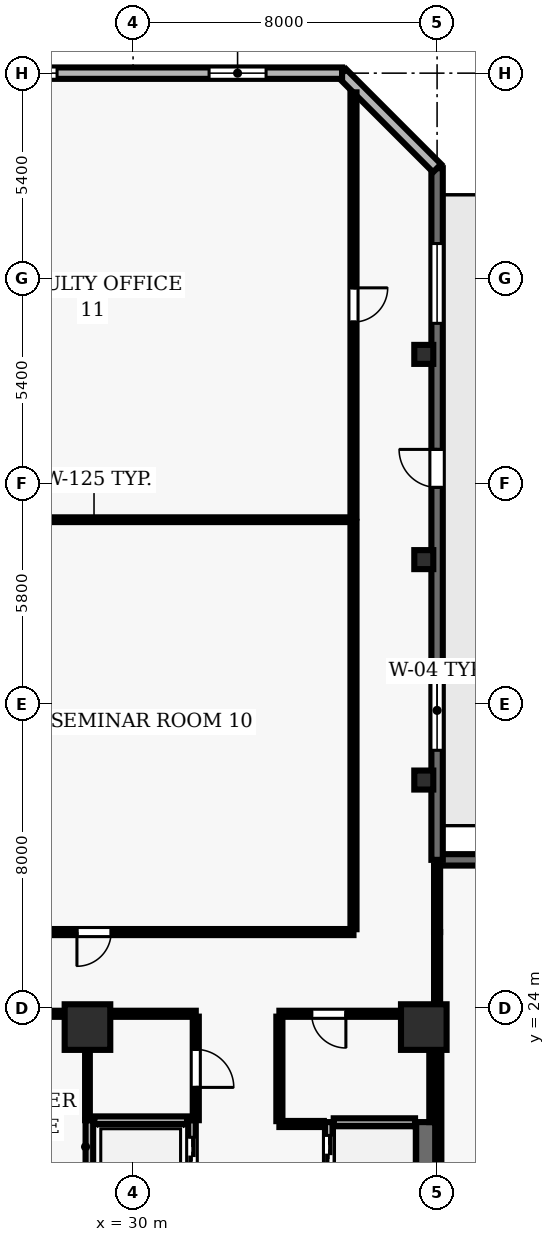
"""IFC4 building model, lengths in metres.
Left out: names, types, materials, properties, quantities, classifications, styles, units other than length and angle.
Written with IfcOpenShell. Run it as: python <this file> out.ifc"""

import sys

from ifc_helpers import new_model, si_unit, direction, frame, frame_2d, origin, origin_2d, place, context, subcontext, project, spatial, rectangle, hollow_rectangle, extrude, element, fill, save


model = new_model("IFC4")
c1 = context("Model", 3, precision=1e-05, world=origin(), true_north=direction((0.0, 1.0)))
c2 = subcontext(c1, "Body", "Model", "MODEL_VIEW")
j1 = project(units=[si_unit("LENGTHUNIT", "METRE"), si_unit("PLANEANGLEUNIT", "RADIAN")], contexts=[c1])
p1 = place(None, origin())
s1 = spatial("IfcSite", under=j1, at=p1, CompositionType="ELEMENT")
p2 = place(p1, origin())
s2 = spatial("IfcBuilding", under=s1, at=p2, CompositionType="ELEMENT")
p3 = place(p2, frame((0.0, 0.0, 130.7)))
s3 = spatial("IfcBuildingStorey", under=s2, at=p3, CompositionType="ELEMENT", Elevation=130.7)
for number, where, z_axis, x_axis in (
    (1, (28.8, 23.5, 0.0), (0.0, 0.0, 1.0), (1.0, 0.0, 0.0)),
    (2, (37.65, 23.5, 0.0), (0.0, 0.0, 1.0), (1.0, 0.0, 0.0)),
):
    element("IfcColumn", number, at=place(p3, frame(where, z_axis=z_axis, x_axis=x_axis)), inside=s3, PredefinedType="COLUMN", context=c2, shape_type="SweptSolid", body=[
        extrude(rectangle(XDim=1.2, YDim=1.2, at=origin_2d()), origin(), (0.0, 0.0, 1.0), 3.9),
    ])
for number, where, z_axis, x_axis in (
    (3, (37.65, 30.0, 0.0), (0.0, 0.0, 1.0), (1.0, 0.0, 0.0)),
    (4, (37.65, 35.8, 0.0), (0.0, 0.0, 1.0), (1.0, 0.0, 0.0)),
    (5, (37.65, 41.2, 0.0), (0.0, 0.0, 1.0), (1.0, 0.0, 0.0)),
):
    element("IfcColumn", number, at=place(p3, frame(where, z_axis=z_axis, x_axis=x_axis)), inside=s3, PredefinedType="COLUMN", context=c2, shape_type="SweptSolid", body=[
        extrude(hollow_rectangle(XDim=0.5, YDim=0.5, WallThickness=0.025, at=origin_2d()), origin(), (0.0, 0.0, 1.0), 3.9),
    ])
p4 = place(p3, frame((46.151, 27.9, 0.0), z_axis=(0.0, 0.0, 1.0), x_axis=(-1.0, 0.0, 0.0)))
e6 = element("IfcWall", 6, at=p4, inside=s3, PredefinedType="SOLIDWALL", context=c2, shape_type="SweptSolid", body=[
    extrude(rectangle(XDim=8.151, YDim=0.3, at=frame_2d((4.075, 0.0))), origin(), (0.0, 0.0, 1.0), 3.69),
])
p5 = place(p4, frame((3.176, 0.0, 0.9)))
e7 = element("IfcOpeningElement", 7, at=p5, cuts=e6, PredefinedType="OPENING", context=c2, shape_type="SweptSolid", body=[
    extrude(rectangle(XDim=1.8, YDim=1.6, at=frame_2d((0.9, 0.8))), frame((0.0, 0.16, 0.0), z_axis=(0.0, -1.0, 0.0), x_axis=(1.0, 0.0, 0.0)), (0.0, 0.0, 1.0), 0.32),
])
p6 = place(p3, frame((38.0, 27.9, 0.0), z_axis=(0.0, 0.0, 1.0), x_axis=(0.0, 1.0, 0.0)))
e8 = element("IfcWall", 8, at=p6, inside=s3, PredefinedType="SOLIDWALL", context=c2, shape_type="SweptSolid", body=[
    extrude(rectangle(XDim=18.2, YDim=0.3, at=frame_2d((9.1, 0.0))), origin(), (0.0, 0.0, 1.0), 3.69),
])
p7 = place(p6, frame((9.8, 0.0, 0.0)))
e9 = element("IfcOpeningElement", 9, at=p7, cuts=e8, PredefinedType="OPENING", context=c2, shape_type="SweptSolid", body=[
    extrude(rectangle(XDim=1.0, YDim=2.2, at=frame_2d((0.5, 1.1))), frame((0.0, 0.16, 0.0), z_axis=(0.0, -1.0, 0.0), x_axis=(1.0, 0.0, 0.0)), (0.0, 0.0, 1.0), 0.32),
])
p8 = place(p6, frame((2.883, 0.0, 0.9)))
e10 = element("IfcOpeningElement", 10, at=p8, cuts=e8, PredefinedType="OPENING", context=c2, shape_type="SweptSolid", body=[
    extrude(rectangle(XDim=2.1, YDim=1.6, at=frame_2d((1.05, 0.8))), frame((0.0, 0.16, 0.0), z_axis=(0.0, -1.0, 0.0), x_axis=(1.0, 0.0, 0.0)), (0.0, 0.0, 1.0), 0.32),
])
p9 = place(p6, frame((14.117, 0.0, 0.9)))
e11 = element("IfcOpeningElement", 11, at=p9, cuts=e8, PredefinedType="OPENING", context=c2, shape_type="SweptSolid", body=[
    extrude(rectangle(XDim=2.1, YDim=1.6, at=frame_2d((1.05, 0.8))), frame((0.0, 0.16, 0.0), z_axis=(0.0, -1.0, 0.0), x_axis=(1.0, 0.0, 0.0)), (0.0, 0.0, 1.0), 0.32),
])
p10 = place(p3, frame((38.0, 46.1, 0.0), z_axis=(0.0, 0.0, 1.0), x_axis=(-0.707106781187, 0.707106781187, 0.0)))
e12 = element("IfcWall", 12, at=p10, inside=s3, PredefinedType="SOLIDWALL", context=c2, shape_type="SweptSolid", body=[
    extrude(rectangle(XDim=3.536, YDim=0.3, at=frame_2d((1.768, 0.0))), origin(), (0.0, 0.0, 1.0), 3.69),
])
p11 = place(p3, frame((35.5, 48.6, 0.0), z_axis=(0.0, 0.0, 1.0), x_axis=(-1.0, 0.0, 0.0)))
e13 = element("IfcWall", 13, at=p11, inside=s3, PredefinedType="SOLIDWALL", context=c2, shape_type="SweptSolid", body=[
    extrude(rectangle(XDim=11.0, YDim=0.3, at=frame_2d((5.5, 0.0))), origin(), (0.0, 0.0, 1.0), 3.69),
])
p12 = place(p11, frame((2.0, 0.0, 0.9)))
e14 = element("IfcOpeningElement", 14, at=p12, cuts=e13, PredefinedType="OPENING", context=c2, shape_type="SweptSolid", body=[
    extrude(rectangle(XDim=1.5, YDim=1.8, at=frame_2d((0.75, 0.9))), frame((0.0, 0.16, 0.0), z_axis=(0.0, -1.0, 0.0), x_axis=(1.0, 0.0, 0.0)), (0.0, 0.0, 1.0), 0.32),
])
p13 = place(p11, frame((7.5, 0.0, 0.9)))
e15 = element("IfcOpeningElement", 15, at=p13, cuts=e13, PredefinedType="OPENING", context=c2, shape_type="SweptSolid", body=[
    extrude(rectangle(XDim=1.5, YDim=1.8, at=frame_2d((0.75, 0.9))), frame((0.0, 0.16, 0.0), z_axis=(0.0, -1.0, 0.0), x_axis=(1.0, 0.0, 0.0)), (0.0, 0.0, 1.0), 0.32),
])
p14 = place(p3, frame((35.15, 21.0, 0.0), z_axis=(0.0, 0.0, 1.0), x_axis=(0.0, -1.0, 0.0)))
e16 = element("IfcWall", 16, at=p14, inside=s3, PredefinedType="SOLIDWALL", context=c2, shape_type="SweptSolid", body=[
    extrude(rectangle(XDim=1.7, YDim=0.2, at=frame_2d((0.85, 0.0))), origin(), (0.0, 0.0, 1.0), 3.69),
])
p15 = place(p14, frame((0.35, 0.0, 0.0)))
e17 = element("IfcOpeningElement", 17, at=p15, cuts=e16, PredefinedType="OPENING", context=c2, shape_type="SweptSolid", body=[
    extrude(rectangle(XDim=1.0, YDim=2.1, at=frame_2d((0.5, 1.05))), frame((0.0, 0.11, 0.0), z_axis=(0.0, -1.0, 0.0), x_axis=(1.0, 0.0, 0.0)), (0.0, 0.0, 1.0), 0.22),
])
p16 = place(p3, frame((37.7, 19.3, 0.0), z_axis=(0.0, 0.0, 1.0), x_axis=(0.0, 1.0, 0.0)))
e18 = element("IfcWall", 18, at=p16, inside=s3, PredefinedType="SHEAR", context=c2, shape_type="SweptSolid", body=[
    extrude(rectangle(XDim=1.7, YDim=0.5, at=frame_2d((0.85, 0.0))), origin(), (0.0, 0.0, 1.0), 3.69),
])
p17 = place(p3, frame((37.42, 21.0, 0.0), z_axis=(0.0, 0.0, 1.0), x_axis=(-1.0, 0.0, 0.0)))
e19 = element("IfcWall", 19, at=p17, inside=s3, PredefinedType="SOLIDWALL", context=c2, shape_type="SweptSolid", body=[
    extrude(rectangle(XDim=2.14, YDim=0.2, at=frame_2d((1.07, 0.0))), origin(), (0.0, 0.0, 1.0), 3.69),
])
p18 = place(p3, frame((28.85, 21.05, 0.0), z_axis=(0.0, 0.0, 1.0), x_axis=(0.0, -1.0, 0.0)))
e20 = element("IfcWall", 20, at=p18, inside=s3, PredefinedType="SOLIDWALL", context=c2, shape_type="SweptSolid", body=[
    extrude(rectangle(XDim=1.9, YDim=0.2, at=frame_2d((0.95, 0.0))), origin(), (0.0, 0.0, 1.0), 3.69),
])
p19 = place(p3, frame((31.55, 19.15, 0.0), z_axis=(0.0, 0.0, 1.0), x_axis=(0.0, 1.0, 0.0)))
e21 = element("IfcWall", 21, at=p19, inside=s3, PredefinedType="SOLIDWALL", context=c2, shape_type="SweptSolid", body=[
    extrude(rectangle(XDim=1.9, YDim=0.2, at=frame_2d((0.95, 0.0))), origin(), (0.0, 0.0, 1.0), 3.69),
])
p20 = place(p19, frame((0.45, 0.0, 0.0)))
e22 = element("IfcOpeningElement", 22, at=p20, cuts=e21, PredefinedType="OPENING", context=c2, shape_type="SweptSolid", body=[
    extrude(rectangle(XDim=1.0, YDim=2.1, at=frame_2d((0.5, 1.05))), frame((0.0, 0.11, 0.0), z_axis=(0.0, -1.0, 0.0), x_axis=(1.0, 0.0, 0.0)), (0.0, 0.0, 1.0), 0.22),
])
p21 = place(p3, frame((31.42, 21.05, 0.0), z_axis=(0.0, 0.0, 1.0), x_axis=(-1.0, 0.0, 0.0)))
e23 = element("IfcWall", 23, at=p21, inside=s3, PredefinedType="SOLIDWALL", context=c2, shape_type="SweptSolid", body=[
    extrude(rectangle(XDim=2.44, YDim=0.2, at=frame_2d((1.22, 0.0))), origin(), (0.0, 0.0, 1.0), 3.69),
])
p22 = place(p3, frame((28.8, 23.85, 0.0), z_axis=(0.0, 0.0, 1.0), x_axis=(-1.0, 0.0, 0.0)))
e24 = element("IfcWall", 24, at=p22, inside=s3, PredefinedType="PARTITIONING", context=c2, shape_type="SweptSolid", body=[
    extrude(rectangle(XDim=3.25, YDim=0.16, at=frame_2d((1.625, 0.0))), origin(), (0.0, 0.0, 1.0), 3.073),
])
p23 = place(p22, frame((1.875, 0.0, 0.0)))
e25 = element("IfcOpeningElement", 25, at=p23, cuts=e24, PredefinedType="OPENING", context=c2, shape_type="SweptSolid", body=[
    extrude(rectangle(XDim=0.9, YDim=2.1, at=frame_2d((0.45, 1.05))), frame((0.0, 0.09, 0.0), z_axis=(0.0, -1.0, 0.0), x_axis=(1.0, 0.0, 0.0)), (0.0, 0.0, 1.0), 0.18),
])
p24 = place(p3, frame((31.65, 23.85, 0.0), z_axis=(0.0, 0.0, 1.0), x_axis=(-1.0, 0.0, 0.0)))
e26 = element("IfcWall", 26, at=p24, inside=s3, PredefinedType="PARTITIONING", context=c2, shape_type="SweptSolid", body=[
    extrude(rectangle(XDim=2.85, YDim=0.16, at=frame_2d((1.425, 0.0))), origin(), (0.0, 0.0, 1.0), 3.073),
])
p25 = place(p3, frame((35.02, 20.95, 0.0), z_axis=(0.0, 0.0, 1.0), x_axis=(-1.0, 0.0, 0.0)))
e27 = element("IfcWall", 27, at=p25, inside=s3, PredefinedType="PARTITIONING", context=c2, shape_type="SweptSolid", body=[
    extrude(rectangle(XDim=1.17, YDim=0.16, at=frame_2d((0.585, 0.0))), origin(), (0.0, 0.0, 1.0), 3.69),
])
p26 = place(p3, frame((35.8, 26.0, 0.0), z_axis=(0.0, 0.0, 1.0), x_axis=(-1.0, 0.0, 0.0)))
e28 = element("IfcWall", 28, at=p26, inside=s3, PredefinedType="PARTITIONING", context=c2, shape_type="SweptSolid", body=[
    extrude(rectangle(XDim=13.655, YDim=0.16, at=frame_2d((6.828, 0.0))), origin(), (0.0, 0.0, 1.0), 3.69),
])
p27 = place(p26, frame((6.377, 0.0, 0.0)))
e29 = element("IfcOpeningElement", 29, at=p27, cuts=e28, PredefinedType="OPENING", context=c2, shape_type="SweptSolid", body=[
    extrude(rectangle(XDim=0.9, YDim=2.1, at=frame_2d((0.45, 1.05))), frame((0.0, 0.09, 0.0), z_axis=(0.0, -1.0, 0.0), x_axis=(1.0, 0.0, 0.0)), (0.0, 0.0, 1.0), 0.18),
])
p28 = place(p3, frame((35.8, 36.85, 0.0), z_axis=(0.0, 0.0, 1.0), x_axis=(-1.0, 0.0, 0.0)))
e30 = element("IfcWall", 30, at=p28, inside=s3, PredefinedType="PARTITIONING", context=c2, shape_type="SweptSolid", body=[
    extrude(rectangle(XDim=13.655, YDim=0.125, at=frame_2d((6.828, 0.0))), origin(), (0.0, 0.0, 1.0), 3.69),
])
p29 = place(p3, frame((37.85, 23.85, 0.0), z_axis=(0.0, 0.0, 1.0), x_axis=(-1.0, 0.0, 0.0)))
e31 = element("IfcWall", 31, at=p29, inside=s3, PredefinedType="PARTITIONING", context=c2, shape_type="SweptSolid", body=[
    extrude(rectangle(XDim=4.0, YDim=0.16, at=frame_2d((2.0, 0.0))), origin(), (0.0, 0.0, 1.0), 3.073),
])
p30 = place(p29, frame((2.25, 0.0, 0.0)))
e32 = element("IfcOpeningElement", 32, at=p30, cuts=e31, PredefinedType="OPENING", context=c2, shape_type="SweptSolid", body=[
    extrude(rectangle(XDim=0.9, YDim=2.1, at=frame_2d((0.45, 1.05))), frame((0.0, 0.09, 0.0), z_axis=(0.0, -1.0, 0.0), x_axis=(1.0, 0.0, 0.0)), (0.0, 0.0, 1.0), 0.18),
])
p31 = place(p3, frame((28.8, 23.775, 0.0), z_axis=(0.0, 0.0, 1.0), x_axis=(0.0, -1.0, 0.0)))
e33 = element("IfcWall", 33, at=p31, inside=s3, PredefinedType="PARTITIONING", context=c2, shape_type="SweptSolid", body=[
    extrude(rectangle(XDim=2.725, YDim=0.125, at=frame_2d((1.362, 0.0))), origin(), (0.0, 0.0, 1.0), 3.69),
])
p32 = place(p3, frame((31.65, 23.775, 0.0), z_axis=(0.0, 0.0, 1.0), x_axis=(0.0, -1.0, 0.0)))
e34 = element("IfcWall", 34, at=p32, inside=s3, PredefinedType="PARTITIONING", context=c2, shape_type="SweptSolid", body=[
    extrude(rectangle(XDim=2.725, YDim=0.16, at=frame_2d((1.362, 0.0))), origin(), (0.0, 0.0, 1.0), 3.69),
])
p33 = place(p32, frame((0.862, 0.0, 0.0)))
e35 = element("IfcOpeningElement", 35, at=p33, cuts=e34, PredefinedType="OPENING", context=c2, shape_type="SweptSolid", body=[
    extrude(rectangle(XDim=1.0, YDim=2.1, at=frame_2d((0.5, 1.05))), frame((0.0, 0.09, 0.0), z_axis=(0.0, -1.0, 0.0), x_axis=(1.0, 0.0, 0.0)), (0.0, 0.0, 1.0), 0.18),
])
p34 = place(p3, frame((33.85, 21.025, 0.0), z_axis=(0.0, 0.0, 1.0), x_axis=(0.0, 1.0, 0.0)))
e36 = element("IfcWall", 36, at=p34, inside=s3, PredefinedType="PARTITIONING", context=c2, shape_type="SweptSolid", body=[
    extrude(rectangle(XDim=2.75, YDim=0.16, at=frame_2d((1.375, 0.0))), origin(), (0.0, 0.0, 1.0), 3.69),
])
p35 = place(p3, frame((35.8, 36.793, 0.0), z_axis=(0.0, 0.0, 1.0), x_axis=(0.0, -1.0, 0.0)))
e37 = element("IfcWall", 37, at=p35, inside=s3, PredefinedType="PARTITIONING", context=c2, shape_type="SweptSolid", body=[
    extrude(rectangle(XDim=10.718, YDim=0.16, at=frame_2d((5.359, 0.0))), origin(), (0.0, 0.0, 1.0), 3.69),
])
p36 = place(p3, frame((35.8, 48.095, 0.0), z_axis=(0.0, 0.0, 1.0), x_axis=(0.0, -1.0, 0.0)))
e38 = element("IfcWall", 38, at=p36, inside=s3, PredefinedType="PARTITIONING", context=c2, shape_type="SweptSolid", body=[
    extrude(rectangle(XDim=11.188, YDim=0.16, at=frame_2d((5.594, 0.0))), origin(), (0.0, 0.0, 1.0), 3.69),
])
p37 = place(p36, frame((5.144, 0.0, 0.0)))
e39 = element("IfcOpeningElement", 39, at=p37, cuts=e38, PredefinedType="OPENING", context=c2, shape_type="SweptSolid", body=[
    extrude(rectangle(XDim=0.9, YDim=2.1, at=frame_2d((0.45, 1.05))), frame((0.0, 0.09, 0.0), z_axis=(0.0, -1.0, 0.0), x_axis=(1.0, 0.0, 0.0)), (0.0, 0.0, 1.0), 0.18),
])
p38 = place(p3, frame((37.85, 21.0, 0.0), z_axis=(0.0, 0.0, 1.0), x_axis=(0.0, 1.0, 0.0)))
e40 = element("IfcWall", 40, at=p38, inside=s3, PredefinedType="MOVABLE", context=c2, shape_type="SweptSolid", body=[
    extrude(rectangle(XDim=2.775, YDim=0.11, at=frame_2d((1.387, 0.0))), origin(), (0.0, 0.0, 1.0), 3.073),
])
p39 = place(p3, frame((38.0, 23.85, 0.0), z_axis=(0.0, 0.0, 1.0), x_axis=(0.0, 1.0, 0.0)))
e41 = element("IfcWall", 41, at=p39, inside=s3, PredefinedType="PARTITIONING", context=c2, shape_type="SweptSolid", body=[
    extrude(rectangle(XDim=2.15, YDim=0.16, at=frame_2d((1.075, 0.0))), origin(), (0.0, 0.0, 1.0), 3.073),
])
p40 = place(p3, frame((38.0, 26.0, 0.0), z_axis=(0.0, 0.0, 1.0), x_axis=(0.0, 1.0, 0.0)))
e42 = element("IfcWall", 42, at=p40, inside=s3, PredefinedType="PARTITIONING", context=c2, shape_type="SweptSolid", body=[
    extrude(rectangle(XDim=1.755, YDim=0.16, at=frame_2d((0.877, 0.0))), origin(), (0.0, 0.0, 1.0), 3.073),
])
p41 = place(p3, frame((38.05, 23.85, 0.0), z_axis=(0.0, 0.0, 1.0), x_axis=(0.0, -1.0, 0.0)))
e43 = element("IfcWall", 43, at=p41, inside=s3, PredefinedType="PARTITIONING", context=c2, shape_type="SweptSolid", body=[
    extrude(rectangle(XDim=7.775, YDim=0.125, at=frame_2d((3.888, 0.0))), origin(), (0.0, 0.0, 1.0), 3.073),
])
p42 = place(p7, origin())
e44 = element("IfcDoor", 44, at=p42, inside=s3, OperationType="SINGLE_SWING_RIGHT", PredefinedType="DOOR", context=c2, shape_type="SweptSolid", body=[
    extrude(rectangle(XDim=1.0, YDim=2.2, at=frame_2d((0.5, 1.1))), frame((0.0, 0.025, 0.0), z_axis=(0.0, -1.0, 0.0), x_axis=(1.0, 0.0, 0.0)), (0.0, 0.0, 1.0), 0.05),
])
fill(e9, e44)
p43 = place(p8, origin())
e45 = element("IfcWindow", 45, at=p43, inside=s3, PartitioningType="SINGLE_PANEL", PredefinedType="WINDOW", context=c2, shape_type="SweptSolid", body=[
    extrude(rectangle(XDim=2.1, YDim=1.6, at=frame_2d((1.05, 0.8))), frame((0.0, 0.03, 0.0), z_axis=(0.0, -1.0, 0.0), x_axis=(1.0, 0.0, 0.0)), (0.0, 0.0, 1.0), 0.06),
])
fill(e10, e45)
p44 = place(p9, origin())
e46 = element("IfcWindow", 46, at=p44, inside=s3, PartitioningType="SINGLE_PANEL", PredefinedType="WINDOW", context=c2, shape_type="SweptSolid", body=[
    extrude(rectangle(XDim=2.1, YDim=1.6, at=frame_2d((1.05, 0.8))), frame((0.0, 0.03, 0.0), z_axis=(0.0, -1.0, 0.0), x_axis=(1.0, 0.0, 0.0)), (0.0, 0.0, 1.0), 0.06),
])
fill(e11, e46)
p45 = place(p12, origin())
e47 = element("IfcWindow", 47, at=p45, inside=s3, PartitioningType="SINGLE_PANEL", PredefinedType="WINDOW", context=c2, shape_type="SweptSolid", body=[
    extrude(rectangle(XDim=1.5, YDim=1.8, at=frame_2d((0.75, 0.9))), frame((0.0, 0.03, 0.0), z_axis=(0.0, -1.0, 0.0), x_axis=(1.0, 0.0, 0.0)), (0.0, 0.0, 1.0), 0.06),
])
fill(e14, e47)
p46 = place(p13, origin())
e48 = element("IfcWindow", 48, at=p46, inside=s3, PartitioningType="SINGLE_PANEL", PredefinedType="WINDOW", context=c2, shape_type="SweptSolid", body=[
    extrude(rectangle(XDim=1.5, YDim=1.8, at=frame_2d((0.75, 0.9))), frame((0.0, 0.03, 0.0), z_axis=(0.0, -1.0, 0.0), x_axis=(1.0, 0.0, 0.0)), (0.0, 0.0, 1.0), 0.06),
])
fill(e15, e48)
p47 = place(p15, origin())
e49 = element("IfcDoor", 49, at=p47, inside=s3, OperationType="DOUBLE_DOOR_SLIDING", PredefinedType="DOOR", context=c2, shape_type="SweptSolid", body=[
    extrude(rectangle(XDim=1.0, YDim=2.1, at=frame_2d((0.5, 1.05))), frame((0.0, 0.025, 0.0), z_axis=(0.0, -1.0, 0.0), x_axis=(1.0, 0.0, 0.0)), (0.0, 0.0, 1.0), 0.05),
])
fill(e17, e49)
p48 = place(p20, origin())
e50 = element("IfcDoor", 50, at=p48, inside=s3, OperationType="DOUBLE_DOOR_SLIDING", PredefinedType="DOOR", context=c2, shape_type="SweptSolid", body=[
    extrude(rectangle(XDim=1.0, YDim=2.1, at=frame_2d((0.5, 1.05))), frame((0.0, 0.025, 0.0), z_axis=(0.0, -1.0, 0.0), x_axis=(1.0, 0.0, 0.0)), (0.0, 0.0, 1.0), 0.05),
])
fill(e22, e50)
p49 = place(p30, origin())
e51 = element("IfcDoor", 51, at=p49, inside=s3, OperationType="SINGLE_SWING_LEFT", PredefinedType="DOOR", context=c2, shape_type="SweptSolid", body=[
    extrude(rectangle(XDim=0.9, YDim=2.1, at=frame_2d((0.45, 1.05))), frame((0.0, 0.025, 0.0), z_axis=(0.0, -1.0, 0.0), x_axis=(1.0, 0.0, 0.0)), (0.0, 0.0, 1.0), 0.05),
])
fill(e32, e51)
p50 = place(p33, origin())
e52 = element("IfcDoor", 52, at=p50, inside=s3, OperationType="SINGLE_SWING_RIGHT", PredefinedType="DOOR", context=c2, shape_type="SweptSolid", body=[
    extrude(rectangle(XDim=1.0, YDim=2.1, at=frame_2d((0.5, 1.05))), frame((0.0, 0.025, 0.0), z_axis=(0.0, -1.0, 0.0), x_axis=(1.0, 0.0, 0.0)), (0.0, 0.0, 1.0), 0.05),
])
fill(e35, e52)
p51 = place(p27, origin())
e53 = element("IfcDoor", 53, at=p51, inside=s3, OperationType="SINGLE_SWING_RIGHT", PredefinedType="DOOR", context=c2, shape_type="SweptSolid", body=[
    extrude(rectangle(XDim=0.9, YDim=2.1, at=frame_2d((0.45, 1.05))), frame((0.0, 0.025, 0.0), z_axis=(0.0, -1.0, 0.0), x_axis=(1.0, 0.0, 0.0)), (0.0, 0.0, 1.0), 0.05),
])
fill(e29, e53)
p52 = place(p37, origin())
e54 = element("IfcDoor", 54, at=p52, inside=s3, OperationType="SINGLE_SWING_LEFT", PredefinedType="DOOR", context=c2, shape_type="SweptSolid", body=[
    extrude(rectangle(XDim=0.9, YDim=2.1, at=frame_2d((0.45, 1.05))), frame((0.0, 0.025, 0.0), z_axis=(0.0, -1.0, 0.0), x_axis=(1.0, 0.0, 0.0)), (0.0, 0.0, 1.0), 0.05),
])
fill(e39, e54)
save(model, sys.argv[1])
